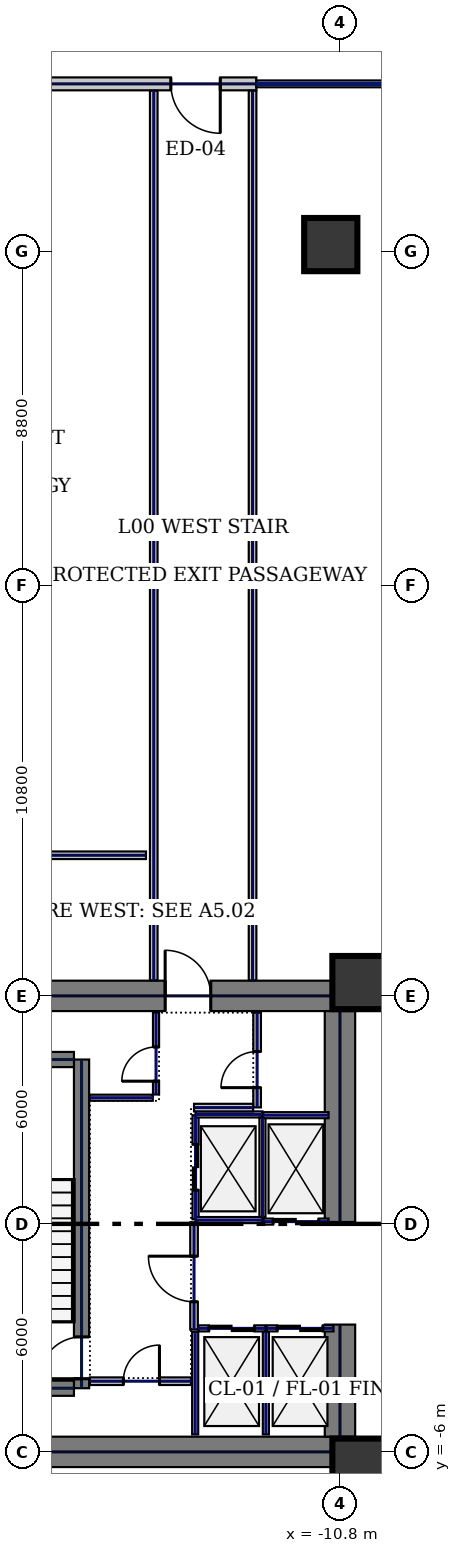
"""IFC4 building model, lengths in metres.
Left out: names, types, materials, properties, quantities, classifications, styles, units other than length and angle.
Written with IfcOpenShell. Run it as: python <this file> out.ifc"""

import sys

from ifc_helpers import new_model, si_unit, direction, frame, frame_2d, origin, origin_2d, place, context, subcontext, project, spatial, rectangle, hollow_circle, extrude, element, fill, save


model = new_model("IFC4")
c1 = context("Model", 3, precision=1e-05, world=origin(), true_north=direction((0.0, 1.0)))
c2 = subcontext(c1, "Body", "Model", "MODEL_VIEW")
j1 = project(units=[si_unit("LENGTHUNIT", "METRE"), si_unit("PLANEANGLEUNIT", "RADIAN")], contexts=[c1])
p1 = place(None, origin())
s1 = spatial("IfcSite", under=j1, at=p1, CompositionType="ELEMENT")
p2 = place(p1, origin())
s2 = spatial("IfcBuilding", under=s1, at=p2, CompositionType="ELEMENT")
p3 = place(p2, origin())
s3 = spatial("IfcBuildingStorey", under=s2, at=p3, CompositionType="ELEMENT", Elevation=0.0)
p4 = place(p3, frame((-22.0, 6.0, 0.0), z_axis=(0.0, 0.0, 1.0), x_axis=(1.0, 0.0, 0.0)))
e1 = element("IfcWall", 1, at=p4, inside=s3, PredefinedType="SHEAR", context=c2, shape_type="SweptSolid", body=[
    extrude(rectangle(XDim=11.6, YDim=0.8, at=frame_2d((5.8, 0.0))), origin(), (0.0, 0.0, 1.0), 8.1),
])
p5 = place(p4, frame((6.6, 0.0, 0.0)))
e2 = element("IfcOpeningElement", 2, at=p5, cuts=e1, PredefinedType="OPENING", context=c2, shape_type="SweptSolid", body=[
    extrude(rectangle(XDim=1.2, YDim=2.2, at=frame_2d((0.6, 1.1))), frame((0.0, 0.41, 0.0), z_axis=(0.0, -1.0, 0.0), x_axis=(1.0, 0.0, 0.0)), (0.0, 0.0, 1.0), 0.82),
])
p6 = place(p3, frame((-22.0, -6.0, 0.0), z_axis=(0.0, 0.0, 1.0), x_axis=(1.0, 0.0, 0.0)))
e3 = element("IfcWall", 3, at=p6, inside=s3, PredefinedType="SHEAR", context=c2, shape_type="SweptSolid", body=[
    extrude(rectangle(XDim=11.6, YDim=0.8, at=frame_2d((5.8, 0.0))), origin(), (0.0, 0.0, 1.0), 8.1),
])
p7 = place(p3, frame((-10.8, -5.6, 0.0), z_axis=(0.0, 0.0, 1.0), x_axis=(0.0, 1.0, 0.0)))
e4 = element("IfcWall", 4, at=p7, inside=s3, PredefinedType="SHEAR", context=c2, shape_type="SweptSolid", body=[
    extrude(rectangle(XDim=2.95, YDim=0.8, at=frame_2d((1.475, 0.0))), origin(), (0.0, 0.0, 1.0), 8.1),
])
p8 = place(p3, frame((-10.8, 0.05, 0.0), z_axis=(0.0, 0.0, 1.0), x_axis=(0.0, 1.0, 0.0)))
e5 = element("IfcWall", 5, at=p8, inside=s3, PredefinedType="SHEAR", context=c2, shape_type="SweptSolid", body=[
    extrude(rectangle(XDim=5.55, YDim=0.8, at=frame_2d((2.775, 0.0))), origin(), (0.0, 0.0, 1.0), 8.1),
])
p9 = place(p3, frame((-17.6, -4.325, 0.0), z_axis=(0.0, 0.0, 1.0), x_axis=(0.0, 1.0, 0.0)))
e6 = element("IfcWall", 6, at=p9, inside=s3, PredefinedType="SHEAR", context=c2, shape_type="SweptSolid", body=[
    extrude(rectangle(XDim=8.65, YDim=0.4, at=frame_2d((4.325, 0.0))), origin(), (0.0, 0.0, 1.0), 8.1),
])
p10 = place(p9, frame((0.25, 0.0, 0.0)))
e7 = element("IfcOpeningElement", 7, at=p10, cuts=e6, PredefinedType="OPENING", context=c2, shape_type="SweptSolid", body=[
    extrude(rectangle(XDim=1.1, YDim=2.2, at=frame_2d((0.55, 1.1))), frame((0.0, 0.21, 0.0), z_axis=(0.0, -1.0, 0.0), x_axis=(1.0, 0.0, 0.0)), (0.0, 0.0, 1.0), 0.42),
])
for number, where, z_axis, x_axis in (
    (8, (-21.2, -4.325, 0.0), (0.0, 0.0, 1.0), (1.0, 0.0, 0.0)),
    (9, (-21.2, 4.325, 0.0), (0.0, 0.0, 1.0), (1.0, 0.0, 0.0)),
):
    element("IfcWall", number, at=place(p3, frame(where, z_axis=z_axis, x_axis=x_axis)), inside=s3, PredefinedType="SHEAR", context=c2, shape_type="SweptSolid", body=[
        extrude(rectangle(XDim=3.4, YDim=0.4, at=frame_2d((1.7, 0.0))), origin(), (0.0, 0.0, 1.0), 8.1),
    ])
for number, where, z_axis, x_axis in (
    (10, (-10.3, -6.35, 0.0), (0.0, 0.0, 1.0), (1.0, 0.0, 0.0)),
    (11, (-10.3, 6.35, 0.0), (0.0, 0.0, 1.0), (1.0, 0.0, 0.0)),
    (12, (-11.042, 25.771, 0.0), (0.0, 0.0, 1.0), (1.0, 0.0, 0.0)),
):
    element("IfcColumn", number, at=place(p3, frame(where, z_axis=z_axis, x_axis=x_axis)), inside=s3, PredefinedType="COLUMN", context=c2, shape_type="SweptSolid", body=[
        extrude(hollow_circle(Radius=0.7, WallThickness=0.05, at=origin_2d()), origin(), (0.0, 0.0, 1.0), 8.1),
    ])
p11 = place(p3, frame((-13.0, 30.0, 0.0), z_axis=(0.0, 0.0, 1.0), x_axis=(-1.0, 0.0, 0.0)))
e13 = element("IfcWall", 13, at=p11, inside=s3, PredefinedType="STANDARD", context=c2, shape_type="SweptSolid", body=[
    extrude(rectangle(XDim=7.5, YDim=0.34, at=frame_2d((3.75, 0.0))), origin(), (0.0, 0.0, 1.0), 8.1),
])
p12 = place(p11, frame((0.95, 0.0, 0.0)))
e14 = element("IfcOpeningElement", 14, at=p12, cuts=e13, PredefinedType="OPENING", context=c2, shape_type="SweptSolid", body=[
    extrude(rectangle(XDim=1.3, YDim=2.2, at=frame_2d((0.65, 1.1))), frame((0.0, 0.18, 0.0), z_axis=(0.0, -1.0, 0.0), x_axis=(1.0, 0.0, 0.0)), (0.0, 0.0, 1.0), 0.36),
])
p13 = place(p3, frame((-14.6, 0.12, 0.0), z_axis=(0.0, 0.0, 1.0), x_axis=(0.0, 1.0, 0.0)))
e15 = element("IfcWall", 15, at=p13, inside=s3, PredefinedType="PARTITIONING", context=c2, shape_type="SweptSolid", body=[
    extrude(rectangle(XDim=2.74, YDim=0.16, at=frame_2d((1.37, 0.0))), origin(), (0.0, 0.0, 1.0), 8.1),
])
p14 = place(p13, frame((0.77, 0.0, 0.0)))
e16 = element("IfcOpeningElement", 16, at=p14, cuts=e15, PredefinedType="OPENING", context=c2, shape_type="SweptSolid", body=[
    extrude(rectangle(XDim=1.2, YDim=2.2, at=frame_2d((0.6, 1.1))), frame((0.0, 0.09, 0.0), z_axis=(0.0, -1.0, 0.0), x_axis=(1.0, 0.0, 0.0)), (0.0, 0.0, 1.0), 0.18),
])
for number, where, z_axis, x_axis in (
    (17, (-14.6, 0.1, 0.0), (0.0, 0.0, 1.0), (1.0, 0.0, 0.0)),
    (18, (-14.6, 2.88, 0.0), (0.0, 0.0, 1.0), (1.0, 0.0, 0.0)),
):
    element("IfcWall", number, at=place(p3, frame(where, z_axis=z_axis, x_axis=x_axis)), inside=s3, PredefinedType="PARTITIONING", context=c2, shape_type="SweptSolid", body=[
        extrude(rectangle(XDim=1.76, YDim=0.16, at=frame_2d((0.88, 0.0))), origin(), (0.0, 0.0, 1.0), 8.1),
    ])
p15 = place(p3, frame((-12.84, 0.18, 0.0), z_axis=(0.0, 0.0, 1.0), x_axis=(0.0, 1.0, 0.0)))
e19 = element("IfcWall", 19, at=p15, inside=s3, PredefinedType="PARTITIONING", context=c2, shape_type="SweptSolid", body=[
    extrude(rectangle(XDim=2.62, YDim=0.16, at=frame_2d((1.31, 0.0))), origin(), (0.0, 0.0, 1.0), 8.1),
])
p16 = place(p3, frame((-14.53, -2.75, 0.0), z_axis=(0.0, 0.0, 1.0), x_axis=(1.0, 0.0, 0.0)))
e20 = element("IfcWall", 20, at=p16, inside=s3, PredefinedType="PARTITIONING", context=c2, shape_type="SweptSolid", body=[
    extrude(rectangle(XDim=1.76, YDim=0.16, at=frame_2d((0.88, 0.0))), origin(), (0.0, 0.0, 1.0), 8.1),
])
p17 = place(p16, frame((0.28, 0.0, 0.0)))
e21 = element("IfcOpeningElement", 21, at=p17, cuts=e20, PredefinedType="OPENING", context=c2, shape_type="SweptSolid", body=[
    extrude(rectangle(XDim=1.2, YDim=2.2, at=frame_2d((0.6, 1.1))), frame((0.0, 0.09, 0.0), z_axis=(0.0, -1.0, 0.0), x_axis=(1.0, 0.0, 0.0)), (0.0, 0.0, 1.0), 0.18),
])
for number, where, z_axis, x_axis in (
    (22, (-12.75, -5.54, 0.0), (0.0, 0.0, 1.0), (0.0, 1.0, 0.0)),
    (23, (-14.61, -5.54, 0.0), (0.0, 0.0, 1.0), (0.0, 1.0, 0.0)),
):
    element("IfcWall", number, at=place(p3, frame(where, z_axis=z_axis, x_axis=x_axis)), inside=s3, PredefinedType="PARTITIONING", context=c2, shape_type="SweptSolid", body=[
        extrude(rectangle(XDim=2.7, YDim=0.16, at=frame_2d((1.35, 0.0))), origin(), (0.0, 0.0, 1.0), 8.1),
    ])
p18 = place(p3, frame((-12.73, -2.75, 0.0), z_axis=(0.0, 0.0, 1.0), x_axis=(1.0, 0.0, 0.0)))
e24 = element("IfcWall", 24, at=p18, inside=s3, PredefinedType="PARTITIONING", context=c2, shape_type="SweptSolid", body=[
    extrude(rectangle(XDim=1.76, YDim=0.16, at=frame_2d((0.88, 0.0))), origin(), (0.0, 0.0, 1.0), 8.1),
])
p19 = place(p18, frame((0.28, 0.0, 0.0)))
e25 = element("IfcOpeningElement", 25, at=p19, cuts=e24, PredefinedType="OPENING", context=c2, shape_type="SweptSolid", body=[
    extrude(rectangle(XDim=1.2, YDim=2.2, at=frame_2d((0.6, 1.1))), frame((0.0, 0.09, 0.0), z_axis=(0.0, -1.0, 0.0), x_axis=(1.0, 0.0, 0.0)), (0.0, 0.0, 1.0), 0.18),
])
p20 = place(p3, frame((-12.82, 0.06, 0.0), z_axis=(0.0, 0.0, 1.0), x_axis=(1.0, 0.0, 0.0)))
e26 = element("IfcWall", 26, at=p20, inside=s3, PredefinedType="PARTITIONING", context=c2, shape_type="SweptSolid", body=[
    extrude(rectangle(XDim=1.72, YDim=0.16, at=frame_2d((0.86, 0.0))), origin(), (0.0, 0.0, 1.0), 8.1),
])
p21 = place(p20, frame((0.26, 0.0, 0.0)))
e27 = element("IfcOpeningElement", 27, at=p21, cuts=e26, PredefinedType="OPENING", context=c2, shape_type="SweptSolid", body=[
    extrude(rectangle(XDim=1.2, YDim=2.2, at=frame_2d((0.6, 1.1))), frame((0.0, 0.09, 0.0), z_axis=(0.0, -1.0, 0.0), x_axis=(1.0, 0.0, 0.0)), (0.0, 0.0, 1.0), 0.18),
])
p22 = place(p3, frame((-12.82, 2.86, 0.0), z_axis=(0.0, 0.0, 1.0), x_axis=(1.0, 0.0, 0.0)))
e28 = element("IfcWall", 28, at=p22, inside=s3, PredefinedType="PARTITIONING", context=c2, shape_type="SweptSolid", body=[
    extrude(rectangle(XDim=1.72, YDim=0.16, at=frame_2d((0.86, 0.0))), origin(), (0.0, 0.0, 1.0), 8.1),
])
p23 = place(p3, frame((-15.64, 3.405, 0.0), z_axis=(0.0, 0.0, 1.0), x_axis=(0.0, 1.0, 0.0)))
e29 = element("IfcWall", 29, at=p23, inside=s3, PredefinedType="PARTITIONING", context=c2, shape_type="SweptSolid", body=[
    extrude(rectangle(XDim=2.155, YDim=0.16, at=frame_2d((1.078, 0.0))), origin(), (0.0, 0.0, 1.0), 8.1),
])
p24 = place(p23, frame((0.35, 0.0, 0.0)))
e30 = element("IfcOpeningElement", 30, at=p24, cuts=e29, PredefinedType="OPENING", context=c2, shape_type="SweptSolid", body=[
    extrude(rectangle(XDim=0.9, YDim=2.2, at=frame_2d((0.45, 1.1))), frame((0.0, 0.09, 0.0), z_axis=(0.0, -1.0, 0.0), x_axis=(1.0, 0.0, 0.0)), (0.0, 0.0, 1.0), 0.18),
])
p25 = place(p3, frame((-17.38, 3.32, 0.0), z_axis=(0.0, 0.0, 1.0), x_axis=(1.0, 0.0, 0.0)))
e31 = element("IfcWall", 31, at=p25, inside=s3, PredefinedType="PARTITIONING", context=c2, shape_type="SweptSolid", body=[
    extrude(rectangle(XDim=1.655, YDim=0.16, at=frame_2d((0.827, 0.0))), origin(), (0.0, 0.0, 1.0), 8.1),
])
p26 = place(p3, frame((-17.38, -4.14, 0.0), z_axis=(0.0, 0.0, 1.0), x_axis=(1.0, 0.0, 0.0)))
e32 = element("IfcWall", 32, at=p26, inside=s3, PredefinedType="SOLIDWALL", context=c2, shape_type="SweptSolid", body=[
    extrude(rectangle(XDim=2.66, YDim=0.2, at=frame_2d((1.33, 0.0))), origin(), (0.0, 0.0, 1.0), 8.1),
])
p27 = place(p26, frame((0.88, 0.0, 0.0)))
e33 = element("IfcOpeningElement", 33, at=p27, cuts=e32, PredefinedType="OPENING", context=c2, shape_type="SweptSolid", body=[
    extrude(rectangle(XDim=0.95, YDim=2.2, at=frame_2d((0.475, 1.1))), frame((0.0, 0.11, 0.0), z_axis=(0.0, -1.0, 0.0), x_axis=(1.0, 0.0, 0.0)), (0.0, 0.0, 1.0), 0.22),
])
p28 = place(p3, frame((-12.98, 3.065, 0.0), z_axis=(0.0, 0.0, 1.0), x_axis=(0.0, 1.0, 0.0)))
e34 = element("IfcWall", 34, at=p28, inside=s3, PredefinedType="SOLIDWALL", context=c2, shape_type="SweptSolid", body=[
    extrude(rectangle(XDim=2.495, YDim=0.2, at=frame_2d((1.248, 0.0))), origin(), (0.0, 0.0, 1.0), 8.1),
])
p29 = place(p28, frame((0.52, 0.0, 0.0)))
e35 = element("IfcOpeningElement", 35, at=p29, cuts=e34, PredefinedType="OPENING", context=c2, shape_type="SweptSolid", body=[
    extrude(rectangle(XDim=0.95, YDim=2.2, at=frame_2d((0.475, 1.1))), frame((0.0, 0.11, 0.0), z_axis=(0.0, -1.0, 0.0), x_axis=(1.0, 0.0, 0.0)), (0.0, 0.0, 1.0), 0.22),
])
p30 = place(p3, frame((-14.64, 3.06, 0.0), z_axis=(0.0, 0.0, 1.0), x_axis=(1.0, 0.0, 0.0)))
e36 = element("IfcWall", 36, at=p30, inside=s3, PredefinedType="SOLIDWALL", context=c2, shape_type="SweptSolid", body=[
    extrude(rectangle(XDim=1.555, YDim=0.2, at=frame_2d((0.777, 0.0))), origin(), (0.0, 0.0, 1.0), 8.1),
])
p31 = place(p3, frame((-14.64, -2.78, 0.0), z_axis=(0.0, 0.0, 1.0), x_axis=(0.0, 1.0, 0.0)))
e37 = element("IfcWall", 37, at=p31, inside=s3, PredefinedType="SOLIDWALL", context=c2, shape_type="SweptSolid", body=[
    extrude(rectangle(XDim=2.82, YDim=0.2, at=frame_2d((1.41, 0.0))), origin(), (0.0, 0.0, 1.0), 8.1),
])
p32 = place(p31, frame((0.73, 0.0, 0.0)))
e38 = element("IfcOpeningElement", 38, at=p32, cuts=e37, PredefinedType="OPENING", context=c2, shape_type="SweptSolid", body=[
    extrude(rectangle(XDim=1.2, YDim=2.2, at=frame_2d((0.6, 1.1))), frame((0.0, 0.11, 0.0), z_axis=(0.0, -1.0, 0.0), x_axis=(1.0, 0.0, 0.0)), (0.0, 0.0, 1.0), 0.22),
])
for number, where, z_axis, x_axis in (
    (39, (-15.7, 6.41, 0.0), (0.0, 0.0, 1.0), (0.0, 1.0, 0.0)),
    (40, (-13.1, 6.41, 0.0), (0.0, 0.0, 1.0), (0.0, 1.0, 0.0)),
):
    element("IfcWall", number, at=place(p3, frame(where, z_axis=z_axis, x_axis=x_axis)), inside=s3, PredefinedType="SOLIDWALL", context=c2, shape_type="SweptSolid", body=[
        extrude(rectangle(XDim=23.41, YDim=0.2, at=frame_2d((11.705, 0.0))), origin(), (0.0, 0.0, 1.0), 8.1),
    ])
p33 = place(p3, frame((-32.895, 9.7, 0.0), z_axis=(0.0, 0.0, 1.0), x_axis=(1.0, 0.0, 0.0)))
e41 = element("IfcWall", 41, at=p33, inside=s3, PredefinedType="SOLIDWALL", context=c2, shape_type="SweptSolid", body=[
    extrude(rectangle(XDim=16.99, YDim=0.2, at=frame_2d((8.495, 0.0))), origin(), (0.0, 0.0, 1.0), 8.1),
])
p34 = place(p33, frame((3.081, 0.0, 0.0)))
e42 = element("IfcOpeningElement", 42, at=p34, cuts=e41, PredefinedType="OPENING", context=c2, shape_type="SweptSolid", body=[
    extrude(rectangle(XDim=1.2, YDim=2.2, at=frame_2d((0.6, 1.1))), frame((0.0, 0.11, 0.0), z_axis=(0.0, -1.0, 0.0), x_axis=(1.0, 0.0, 0.0)), (0.0, 0.0, 1.0), 0.22),
])
p35 = place(p33, frame((11.319, 0.0, 0.0)))
e43 = element("IfcOpeningElement", 43, at=p35, cuts=e41, PredefinedType="OPENING", context=c2, shape_type="SweptSolid", body=[
    extrude(rectangle(XDim=1.2, YDim=2.2, at=frame_2d((0.6, 1.1))), frame((0.0, 0.11, 0.0), z_axis=(0.0, -1.0, 0.0), x_axis=(1.0, 0.0, 0.0)), (0.0, 0.0, 1.0), 0.22),
])
p36 = place(p12, origin())
e44 = element("IfcDoor", 44, at=p36, inside=s3, OperationType="SINGLE_SWING_LEFT", PredefinedType="DOOR", context=c2, shape_type="SweptSolid", body=[
    extrude(rectangle(XDim=1.3, YDim=2.2, at=frame_2d((0.65, 1.1))), frame((0.0, 0.025, 0.0), z_axis=(0.0, -1.0, 0.0), x_axis=(1.0, 0.0, 0.0)), (0.0, 0.0, 1.0), 0.05),
])
fill(e14, e44)
p37 = place(p5, origin())
e45 = element("IfcDoor", 45, at=p37, inside=s3, OperationType="SINGLE_SWING_LEFT", PredefinedType="DOOR", context=c2, shape_type="SweptSolid", body=[
    extrude(rectangle(XDim=1.2, YDim=2.2, at=frame_2d((0.6, 1.1))), frame((0.0, 0.025, 0.0), z_axis=(0.0, -1.0, 0.0), x_axis=(1.0, 0.0, 0.0)), (0.0, 0.0, 1.0), 0.05),
])
fill(e2, e45)
p38 = place(p10, origin())
e46 = element("IfcDoor", 46, at=p38, inside=s3, OperationType="SINGLE_SWING_LEFT", PredefinedType="DOOR", context=c2, shape_type="SweptSolid", body=[
    extrude(rectangle(XDim=1.1, YDim=2.2, at=frame_2d((0.55, 1.1))), frame((0.0, 0.025, 0.0), z_axis=(0.0, -1.0, 0.0), x_axis=(1.0, 0.0, 0.0)), (0.0, 0.0, 1.0), 0.05),
])
fill(e7, e46)
p39 = place(p14, origin())
e47 = element("IfcDoor", 47, at=p39, inside=s3, OperationType="SLIDING_TO_LEFT", PredefinedType="DOOR", context=c2, shape_type="SweptSolid", body=[
    extrude(rectangle(XDim=1.2, YDim=2.2, at=frame_2d((0.6, 1.1))), frame((0.0, 0.025, 0.0), z_axis=(0.0, -1.0, 0.0), x_axis=(1.0, 0.0, 0.0)), (0.0, 0.0, 1.0), 0.05),
])
fill(e16, e47)
p40 = place(p17, origin())
e48 = element("IfcDoor", 48, at=p40, inside=s3, OperationType="SLIDING_TO_LEFT", PredefinedType="DOOR", context=c2, shape_type="SweptSolid", body=[
    extrude(rectangle(XDim=1.2, YDim=2.2, at=frame_2d((0.6, 1.1))), frame((0.0, 0.025, 0.0), z_axis=(0.0, -1.0, 0.0), x_axis=(1.0, 0.0, 0.0)), (0.0, 0.0, 1.0), 0.05),
])
fill(e21, e48)
p41 = place(p19, origin())
e49 = element("IfcDoor", 49, at=p41, inside=s3, OperationType="SLIDING_TO_LEFT", PredefinedType="DOOR", context=c2, shape_type="SweptSolid", body=[
    extrude(rectangle(XDim=1.2, YDim=2.2, at=frame_2d((0.6, 1.1))), frame((0.0, 0.025, 0.0), z_axis=(0.0, -1.0, 0.0), x_axis=(1.0, 0.0, 0.0)), (0.0, 0.0, 1.0), 0.05),
])
fill(e25, e49)
p42 = place(p21, origin())
e50 = element("IfcDoor", 50, at=p42, inside=s3, OperationType="SLIDING_TO_LEFT", PredefinedType="DOOR", context=c2, shape_type="SweptSolid", body=[
    extrude(rectangle(XDim=1.2, YDim=2.2, at=frame_2d((0.6, 1.1))), frame((0.0, 0.025, 0.0), z_axis=(0.0, -1.0, 0.0), x_axis=(1.0, 0.0, 0.0)), (0.0, 0.0, 1.0), 0.05),
])
fill(e27, e50)
p43 = place(p24, origin())
e51 = element("IfcDoor", 51, at=p43, inside=s3, OperationType="SINGLE_SWING_LEFT", PredefinedType="DOOR", context=c2, shape_type="SweptSolid", body=[
    extrude(rectangle(XDim=0.9, YDim=2.2, at=frame_2d((0.45, 1.1))), frame((0.0, 0.025, 0.0), z_axis=(0.0, -1.0, 0.0), x_axis=(1.0, 0.0, 0.0)), (0.0, 0.0, 1.0), 0.05),
])
fill(e30, e51)
p44 = place(p27, origin())
e52 = element("IfcDoor", 52, at=p44, inside=s3, OperationType="SINGLE_SWING_RIGHT", PredefinedType="DOOR", context=c2, shape_type="SweptSolid", body=[
    extrude(rectangle(XDim=0.95, YDim=2.2, at=frame_2d((0.475, 1.1))), frame((0.0, 0.025, 0.0), z_axis=(0.0, -1.0, 0.0), x_axis=(1.0, 0.0, 0.0)), (0.0, 0.0, 1.0), 0.05),
])
fill(e33, e52)
p45 = place(p29, origin())
e53 = element("IfcDoor", 53, at=p45, inside=s3, OperationType="SINGLE_SWING_LEFT", PredefinedType="DOOR", context=c2, shape_type="SweptSolid", body=[
    extrude(rectangle(XDim=0.95, YDim=2.2, at=frame_2d((0.475, 1.1))), frame((0.0, 0.025, 0.0), z_axis=(0.0, -1.0, 0.0), x_axis=(1.0, 0.0, 0.0)), (0.0, 0.0, 1.0), 0.05),
])
fill(e35, e53)
p46 = place(p32, origin())
e54 = element("IfcDoor", 54, at=p46, inside=s3, OperationType="SINGLE_SWING_RIGHT", PredefinedType="DOOR", context=c2, shape_type="SweptSolid", body=[
    extrude(rectangle(XDim=1.2, YDim=2.2, at=frame_2d((0.6, 1.1))), frame((0.0, 0.025, 0.0), z_axis=(0.0, -1.0, 0.0), x_axis=(1.0, 0.0, 0.0)), (0.0, 0.0, 1.0), 0.05),
])
fill(e38, e54)
save(model, sys.argv[1])
